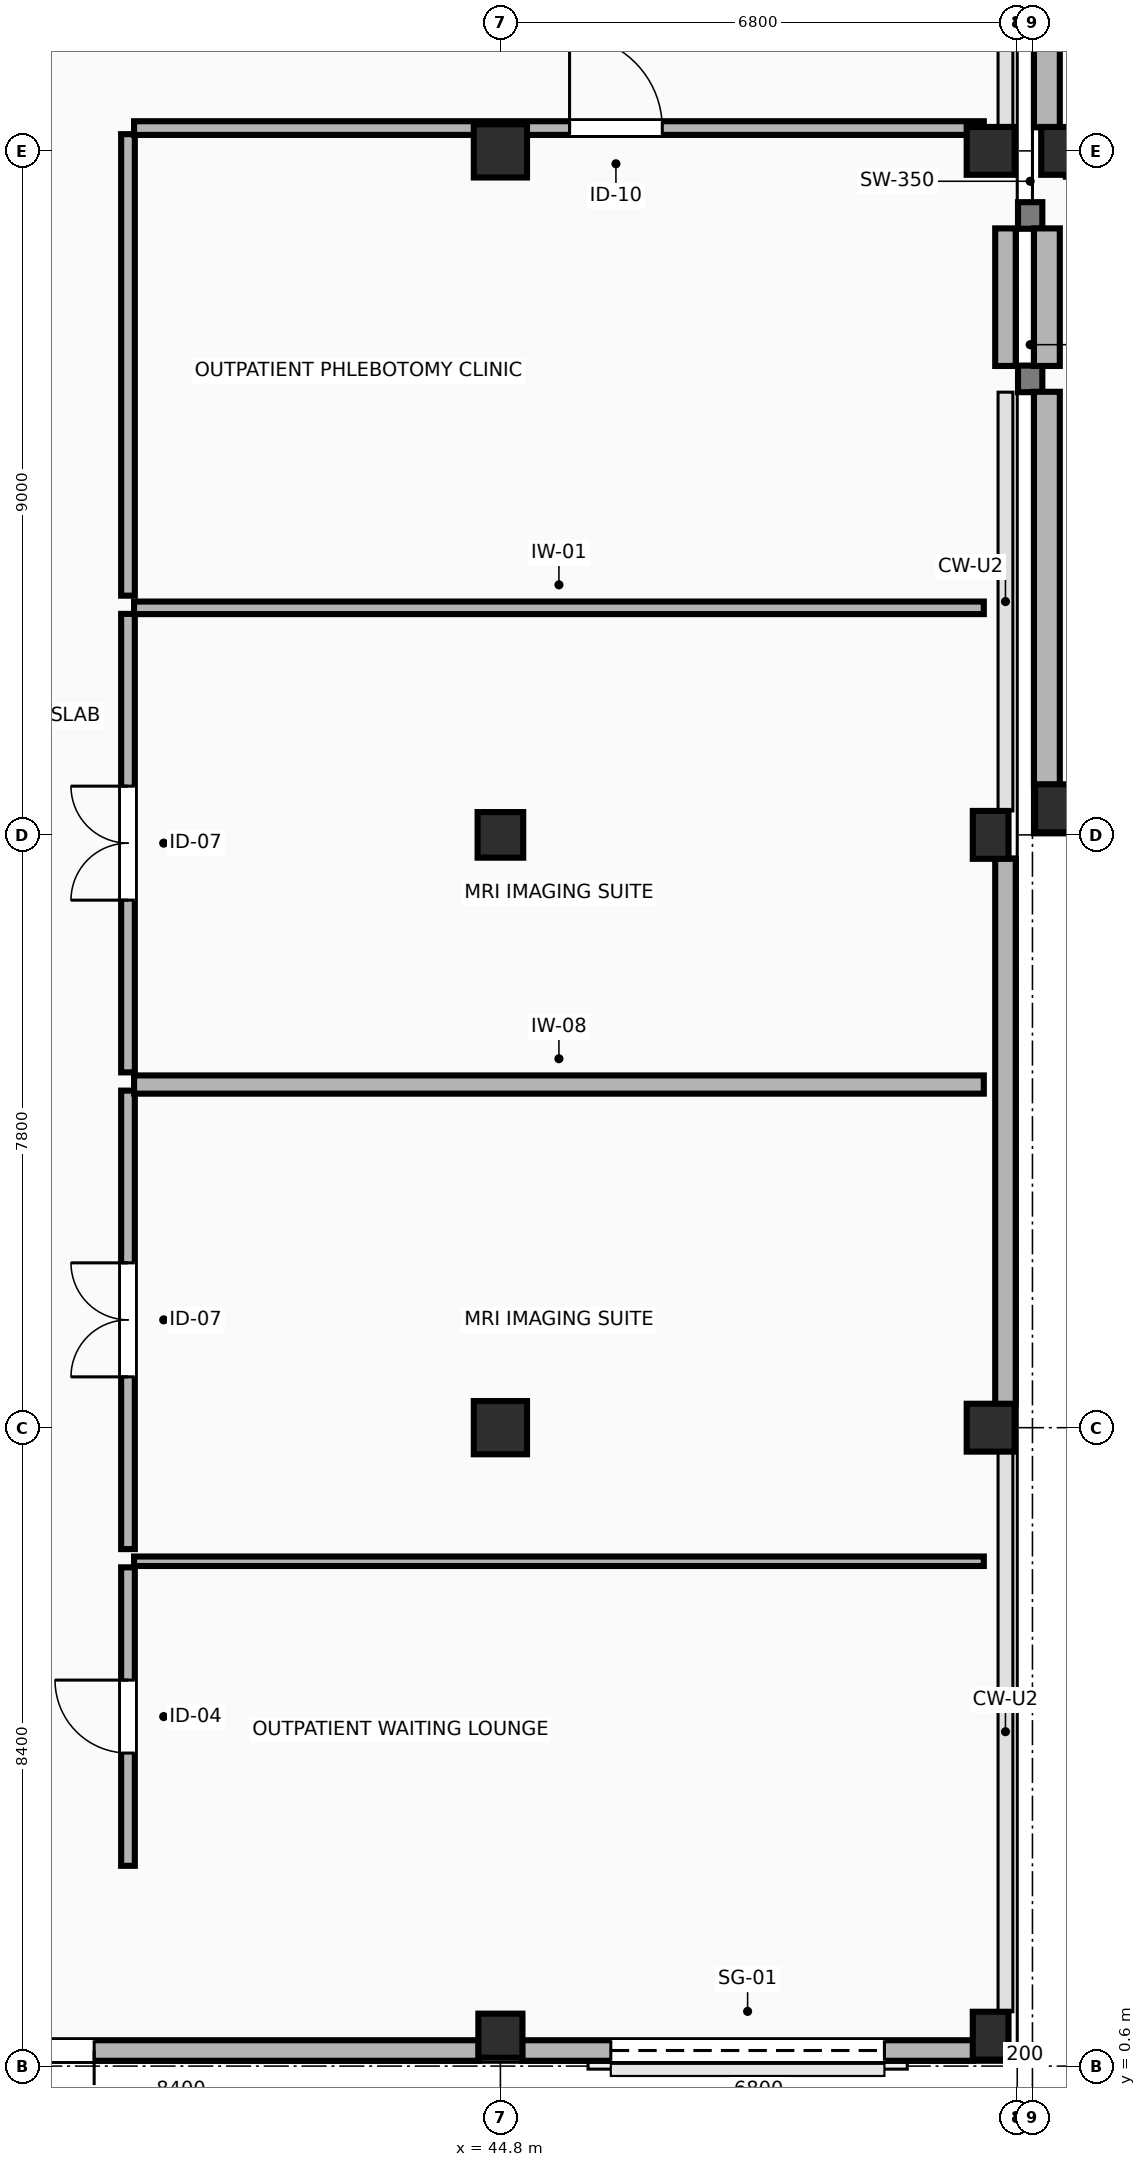
"""IFC4 building model, lengths in metres.
Left out: names, types, materials, properties, quantities, classifications, styles, units other than length and angle.
Written with IfcOpenShell. Run it as: python <this file> out.ifc"""

import sys

from ifc_helpers import new_model, si_unit, direction, frame, frame_2d, origin, origin_2d, place, context, subcontext, project, spatial, rectangle, extrude, element, fill, save


model = new_model("IFC4")
c1 = context("Model", 3, precision=1e-05, world=origin(), true_north=direction((0.0, 1.0)))
c2 = subcontext(c1, "Body", "Model", "MODEL_VIEW")
j1 = project(units=[si_unit("LENGTHUNIT", "METRE"), si_unit("PLANEANGLEUNIT", "RADIAN")], contexts=[c1])
p1 = place(None, origin())
s1 = spatial("IfcSite", under=j1, at=p1, CompositionType="ELEMENT")
p2 = place(p1, origin())
s2 = spatial("IfcBuilding", under=s1, at=p2, CompositionType="ELEMENT")
p3 = place(p2, origin())
s3 = spatial("IfcBuildingStorey", under=s2, at=p3, CompositionType="ELEMENT", Elevation=0.0)
p4 = place(p3, frame((44.8, 1.0, -1.75), z_axis=(0.0, 0.0, 1.0), x_axis=(1.0, 0.0, 0.0)))
e1 = element("IfcColumn", 1, at=p4, inside=s3, PredefinedType="COLUMN", context=c2, shape_type="SweptSolid", body=[
    extrude(rectangle(XDim=0.58, YDim=0.58, at=origin_2d()), origin(), (0.0, 0.0, 1.0), 7.15),
])
p5 = place(p3, frame((44.8, 9.0, 0.0), z_axis=(0.0, 0.0, 1.0), x_axis=(1.0, 0.0, 0.0)))
e2 = element("IfcColumn", 2, at=p5, inside=s3, PredefinedType="COLUMN", context=c2, shape_type="SweptSolid", body=[
    extrude(rectangle(XDim=0.7, YDim=0.7, at=origin_2d()), origin(), (0.0, 0.0, 1.0), 5.4),
])
p6 = place(p3, frame((44.8, 16.8, 0.0), z_axis=(0.0, 0.0, 1.0), x_axis=(1.0, 0.0, 0.0)))
e3 = element("IfcColumn", 3, at=p6, inside=s3, PredefinedType="COLUMN", context=c2, shape_type="SweptSolid", body=[
    extrude(rectangle(XDim=0.6, YDim=0.6, at=origin_2d()), origin(), (0.0, 0.0, 1.0), 5.4),
])
p7 = place(p3, frame((44.8, 25.8, 0.0), z_axis=(0.0, 0.0, 1.0), x_axis=(1.0, 0.0, 0.0)))
e4 = element("IfcColumn", 4, at=p7, inside=s3, PredefinedType="COLUMN", context=c2, shape_type="SweptSolid", body=[
    extrude(rectangle(XDim=0.7, YDim=0.7, at=origin_2d()), origin(), (0.0, 0.0, 1.0), 5.4),
])
p8 = place(p3, frame((51.25, 1.0, -1.75), z_axis=(0.0, 0.0, 1.0), x_axis=(1.0, 0.0, 0.0)))
e5 = element("IfcColumn", 5, at=p8, inside=s3, PredefinedType="COLUMN", context=c2, shape_type="SweptSolid", body=[
    extrude(rectangle(XDim=0.47, YDim=0.63, at=origin_2d()), origin(), (0.0, 0.0, 1.0), 7.15),
])
p9 = place(p3, frame((51.25, 9.0, 0.0), z_axis=(0.0, 0.0, 1.0), x_axis=(1.0, 0.0, 0.0)))
e6 = element("IfcColumn", 6, at=p9, inside=s3, PredefinedType="COLUMN", context=c2, shape_type="SweptSolid", body=[
    extrude(rectangle(XDim=0.63, YDim=0.63, at=origin_2d()), origin(), (0.0, 0.0, 1.0), 5.4),
])
p10 = place(p3, frame((51.25, 16.8, 0.0), z_axis=(0.0, 0.0, 1.0), x_axis=(1.0, 0.0, 0.0)))
e7 = element("IfcColumn", 7, at=p10, inside=s3, PredefinedType="COLUMN", context=c2, shape_type="SweptSolid", body=[
    extrude(rectangle(XDim=0.47, YDim=0.63, at=origin_2d()), origin(), (0.0, 0.0, 1.0), 5.4),
])
p11 = place(p3, frame((51.25, 25.8, 0.0), z_axis=(0.0, 0.0, 1.0), x_axis=(1.0, 0.0, 0.0)))
e8 = element("IfcColumn", 8, at=p11, inside=s3, PredefinedType="COLUMN", context=c2, shape_type="SweptSolid", body=[
    extrude(rectangle(XDim=0.63, YDim=0.63, at=origin_2d()), origin(), (0.0, 0.0, 1.0), 5.4),
])
p12 = place(p3, frame((52.15, 17.15, -1.75), z_axis=(0.0, 0.0, 1.0), x_axis=(1.0, 0.0, 0.0)))
e9 = element("IfcColumn", 9, at=p12, inside=s3, PredefinedType="COLUMN", context=c2, shape_type="SweptSolid", body=[
    extrude(rectangle(XDim=0.63, YDim=0.63, at=origin_2d()), origin(), (0.0, 0.0, 1.0), 7.15),
])
p13 = place(p3, frame((52.15, 25.8, -1.75), z_axis=(0.0, 0.0, 1.0), x_axis=(1.0, 0.0, 0.0)))
e10 = element("IfcColumn", 10, at=p13, inside=s3, PredefinedType="COLUMN", context=c2, shape_type="SweptSolid", body=[
    extrude(rectangle(XDim=0.47, YDim=0.63, at=origin_2d()), origin(), (0.0, 0.0, 1.0), 7.15),
])
for number, where, z_axis, x_axis in (
    (11, (51.61, 22.8, -1.75), (0.0, 0.0, 1.0), (1.0, 0.0, 0.0)),
    (12, (51.61, 24.95, -1.75), (0.0, 0.0, 1.0), (1.0, 0.0, 0.0)),
):
    element("IfcWall", number, at=place(p3, frame(where, z_axis=z_axis, x_axis=x_axis)), inside=s3, PredefinedType="SHEAR", context=c2, shape_type="SweptSolid", body=[
        extrude(rectangle(XDim=0.32, YDim=0.35, at=frame_2d((0.16, 0.0))), origin(), (0.0, 0.0, 1.0), 7.15),
    ])
p14 = place(p3, frame((36.71, 0.805, 0.0), z_axis=(0.0, 0.0, 1.0), x_axis=(1.0, 0.0, 0.0)))
e13 = element("IfcWall", 13, at=p14, inside=s3, PredefinedType="STANDARD", context=c2, shape_type="SweptSolid", body=[
    extrude(rectangle(XDim=7.805, YDim=0.27, at=frame_2d((3.902, 0.0))), origin(), (0.0, 0.0, 1.0), 4.42),
])
p15 = place(p14, frame((0.745, 0.0, 0.0)))
e14 = element("IfcOpeningElement", 14, at=p15, cuts=e13, PredefinedType="OPENING", context=c2, shape_type="SweptSolid", body=[
    extrude(rectangle(XDim=2.0, YDim=2.4, at=frame_2d((1.0, 1.2))), frame((0.0, 0.145, 0.0), z_axis=(0.0, -1.0, 0.0), x_axis=(1.0, 0.0, 0.0)), (0.0, 0.0, 1.0), 0.29),
])
p16 = place(p3, frame((45.085, 0.805, 0.0), z_axis=(0.0, 0.0, 1.0), x_axis=(1.0, 0.0, 0.0)))
e15 = element("IfcWall", 15, at=p16, inside=s3, PredefinedType="STANDARD", context=c2, shape_type="SweptSolid", body=[
    extrude(rectangle(XDim=5.935, YDim=0.27, at=frame_2d((2.968, 0.0))), origin(), (0.0, 0.0, 1.0), 4.62),
])
p17 = place(p16, frame((1.167, 0.0, 0.0)))
e16 = element("IfcOpeningElement", 16, at=p17, cuts=e15, PredefinedType="OPENING", context=c2, shape_type="SweptSolid", body=[
    extrude(rectangle(XDim=3.6, YDim=3.0, at=frame_2d((1.8, 1.5))), frame((0.0, 0.145, 0.0), z_axis=(0.0, -1.0, 0.0), x_axis=(1.0, 0.0, 0.0)), (0.0, 0.0, 1.0), 0.29),
])
p18 = place(p3, frame((51.445, 9.31, 0.0), z_axis=(0.0, 0.0, 1.0), x_axis=(0.0, 1.0, 0.0)))
e17 = element("IfcWall", 17, at=p18, inside=s3, PredefinedType="STANDARD", context=c2, shape_type="SweptSolid", body=[
    extrude(rectangle(XDim=7.18, YDim=0.27, at=frame_2d((3.59, 0.0))), origin(), (0.0, 0.0, 1.0), 4.57),
])
p19 = place(p3, frame((51.445, 22.97, 0.0), z_axis=(0.0, 0.0, 1.0), x_axis=(0.0, 1.0, 0.0)))
e18 = element("IfcWall", 18, at=p19, inside=s3, PredefinedType="STANDARD", context=c2, shape_type="SweptSolid", body=[
    extrude(rectangle(XDim=1.81, YDim=0.27, at=frame_2d((0.905, 0.0))), origin(), (0.0, 0.0, 1.0), 3.508),
])
p20 = place(p3, frame((51.99, 33.94, 0.0), z_axis=(0.0, 0.0, 1.0), x_axis=(0.0, -1.0, 0.0)))
e19 = element("IfcWall", 19, at=p20, inside=s3, PredefinedType="STANDARD", context=c2, shape_type="SweptSolid", body=[
    extrude(rectangle(XDim=7.83, YDim=0.34, at=frame_2d((3.915, 0.0))), origin(), (0.0, 0.0, 1.0), 4.565),
])
p21 = place(p3, frame((51.99, 24.78, 0.0), z_axis=(0.0, 0.0, 1.0), x_axis=(0.0, -1.0, 0.0)))
e20 = element("IfcWall", 20, at=p21, inside=s3, PredefinedType="STANDARD", context=c2, shape_type="SweptSolid", body=[
    extrude(rectangle(XDim=1.81, YDim=0.34, at=frame_2d((0.905, 0.0))), origin(), (0.0, 0.0, 1.0), 3.508),
])
p22 = place(p3, frame((51.99, 22.63, 0.0), z_axis=(0.0, 0.0, 1.0), x_axis=(0.0, -1.0, 0.0)))
e21 = element("IfcWall", 21, at=p22, inside=s3, PredefinedType="STANDARD", context=c2, shape_type="SweptSolid", body=[
    extrude(rectangle(XDim=5.17, YDim=0.34, at=frame_2d((2.585, 0.0))), origin(), (0.0, 0.0, 1.0), 3.508),
])
p23 = place(p3, frame((39.98, 7.242, 0.0), z_axis=(0.0, 0.0, 1.0), x_axis=(1.0, 0.0, 0.0)))
e22 = element("IfcWall", 22, at=p23, inside=s3, PredefinedType="PARTITIONING", context=c2, shape_type="SweptSolid", body=[
    extrude(rectangle(XDim=11.18, YDim=0.125, at=frame_2d((5.59, 0.0))), origin(), (0.0, 0.0, 1.0), 5.05),
])
p24 = place(p3, frame((39.9, 3.235, 0.0), z_axis=(0.0, 0.0, 1.0), x_axis=(0.0, 1.0, 0.0)))
e23 = element("IfcWall", 23, at=p24, inside=s3, PredefinedType="PARTITIONING", context=c2, shape_type="SweptSolid", body=[
    extrude(rectangle(XDim=3.927, YDim=0.18, at=frame_2d((1.964, 0.0))), origin(), (0.0, 0.0, 1.0), 5.05),
])
p25 = place(p24, frame((1.484, 0.0, 0.0)))
e24 = element("IfcOpeningElement", 24, at=p25, cuts=e23, PredefinedType="OPENING", context=c2, shape_type="SweptSolid", body=[
    extrude(rectangle(XDim=0.96, YDim=2.1, at=frame_2d((0.48, 1.05))), frame((0.0, 0.1, 0.0), z_axis=(0.0, -1.0, 0.0), x_axis=(1.0, 0.0, 0.0)), (0.0, 0.0, 1.0), 0.2),
])
p26 = place(p3, frame((39.9, 7.403, 0.0), z_axis=(0.0, 0.0, 1.0), x_axis=(0.0, 1.0, 0.0)))
e25 = element("IfcWall", 25, at=p26, inside=s3, PredefinedType="PARTITIONING", context=c2, shape_type="SweptSolid", body=[
    extrude(rectangle(XDim=6.032, YDim=0.18, at=frame_2d((3.016, 0.0))), origin(), (0.0, 0.0, 1.0), 5.05),
])
p27 = place(p26, frame((2.266, 0.0, 0.0)))
e26 = element("IfcOpeningElement", 26, at=p27, cuts=e25, PredefinedType="OPENING", context=c2, shape_type="SweptSolid", body=[
    extrude(rectangle(XDim=1.5, YDim=2.3, at=frame_2d((0.75, 1.15))), frame((0.0, 0.1, 0.0), z_axis=(0.0, -1.0, 0.0), x_axis=(1.0, 0.0, 0.0)), (0.0, 0.0, 1.0), 0.2),
])
p28 = place(p3, frame((39.98, 13.515, 0.0), z_axis=(0.0, 0.0, 1.0), x_axis=(1.0, 0.0, 0.0)))
e27 = element("IfcWall", 27, at=p28, inside=s3, PredefinedType="PARTITIONING", context=c2, shape_type="SweptSolid", body=[
    extrude(rectangle(XDim=11.18, YDim=0.24, at=frame_2d((5.59, 0.0))), origin(), (0.0, 0.0, 1.0), 5.05),
])
p29 = place(p3, frame((39.9, 13.675, 0.0), z_axis=(0.0, 0.0, 1.0), x_axis=(0.0, 1.0, 0.0)))
e28 = element("IfcWall", 28, at=p29, inside=s3, PredefinedType="PARTITIONING", context=c2, shape_type="SweptSolid", body=[
    extrude(rectangle(XDim=6.032, YDim=0.18, at=frame_2d((3.016, 0.0))), origin(), (0.0, 0.0, 1.0), 5.05),
])
p30 = place(p29, frame((2.266, 0.0, 0.0)))
e29 = element("IfcOpeningElement", 29, at=p30, cuts=e28, PredefinedType="OPENING", context=c2, shape_type="SweptSolid", body=[
    extrude(rectangle(XDim=1.5, YDim=2.3, at=frame_2d((0.75, 1.15))), frame((0.0, 0.1, 0.0), z_axis=(0.0, -1.0, 0.0), x_axis=(1.0, 0.0, 0.0)), (0.0, 0.0, 1.0), 0.2),
])
p31 = place(p3, frame((39.98, 19.788, 0.0), z_axis=(0.0, 0.0, 1.0), x_axis=(1.0, 0.0, 0.0)))
e30 = element("IfcWall", 30, at=p31, inside=s3, PredefinedType="PARTITIONING", context=c2, shape_type="SweptSolid", body=[
    extrude(rectangle(XDim=11.18, YDim=0.165, at=frame_2d((5.59, 0.0))), origin(), (0.0, 0.0, 1.0), 5.05),
])
p32 = place(p3, frame((39.9, 19.948, 0.0), z_axis=(0.0, 0.0, 1.0), x_axis=(0.0, 1.0, 0.0)))
e31 = element("IfcWall", 31, at=p32, inside=s3, PredefinedType="PARTITIONING", context=c2, shape_type="SweptSolid", body=[
    extrude(rectangle(XDim=6.073, YDim=0.18, at=frame_2d((3.036, 0.0))), origin(), (0.0, 0.0, 1.0), 5.05),
])
p33 = place(p3, frame((39.98, 26.1, 0.0), z_axis=(0.0, 0.0, 1.0), x_axis=(1.0, 0.0, 0.0)))
e32 = element("IfcWall", 32, at=p33, inside=s3, PredefinedType="PARTITIONING", context=c2, shape_type="SweptSolid", body=[
    extrude(rectangle(XDim=11.18, YDim=0.18, at=frame_2d((5.59, 0.0))), origin(), (0.0, 0.0, 1.0), 4.385),
])
p34 = place(p33, frame((5.73, 0.0, 0.0)))
e33 = element("IfcOpeningElement", 33, at=p34, cuts=e32, PredefinedType="OPENING", context=c2, shape_type="SweptSolid", body=[
    extrude(rectangle(XDim=1.22, YDim=2.18, at=frame_2d((0.61, 1.09))), frame((0.0, 0.1, 0.0), z_axis=(0.0, -1.0, 0.0), x_axis=(1.0, 0.0, 0.0)), (0.0, 0.0, 1.0), 0.2),
])
p35 = place(p15, frame((2.0, 0.0, 0.0), z_axis=(0.0, 0.0, 1.0), x_axis=(-1.0, 0.0, 0.0)))
e34 = element("IfcDoor", 34, at=p35, inside=s3, OperationType="DOUBLE_DOOR_SINGLE_SWING", PredefinedType="DOOR", context=c2, shape_type="SweptSolid", body=[
    extrude(rectangle(XDim=2.0, YDim=2.4, at=frame_2d((1.0, 1.2))), frame((0.0, 0.025, 0.0), z_axis=(0.0, -1.0, 0.0), x_axis=(1.0, 0.0, 0.0)), (0.0, 0.0, 1.0), 0.05),
])
fill(e14, e34)
p36 = place(p17, frame((3.6, 0.0, 0.0), z_axis=(0.0, 0.0, 1.0), x_axis=(-1.0, 0.0, 0.0)))
e35 = element("IfcDoor", 35, at=p36, inside=s3, OperationType="DOUBLE_DOOR_SINGLE_SWING", PredefinedType="GATE", context=c2, shape_type="SweptSolid", body=[
    extrude(rectangle(XDim=3.6, YDim=3.0, at=frame_2d((1.8, 1.5))), frame((0.0, 0.025, 0.0), z_axis=(0.0, -1.0, 0.0), x_axis=(1.0, 0.0, 0.0)), (0.0, 0.0, 1.0), 0.05),
])
fill(e16, e35)
p37 = place(p25, origin())
e36 = element("IfcDoor", 36, at=p37, inside=s3, OperationType="SINGLE_SWING_RIGHT", PredefinedType="DOOR", context=c2, shape_type="SweptSolid", body=[
    extrude(rectangle(XDim=0.96, YDim=2.1, at=frame_2d((0.48, 1.05))), frame((0.0, 0.025, 0.0), z_axis=(0.0, -1.0, 0.0), x_axis=(1.0, 0.0, 0.0)), (0.0, 0.0, 1.0), 0.05),
])
fill(e24, e36)
p38 = place(p27, origin())
e37 = element("IfcDoor", 37, at=p38, inside=s3, OperationType="DOUBLE_DOOR_SINGLE_SWING", PredefinedType="DOOR", context=c2, shape_type="SweptSolid", body=[
    extrude(rectangle(XDim=1.5, YDim=2.3, at=frame_2d((0.75, 1.15))), frame((0.0, 0.025, 0.0), z_axis=(0.0, -1.0, 0.0), x_axis=(1.0, 0.0, 0.0)), (0.0, 0.0, 1.0), 0.05),
])
fill(e26, e37)
p39 = place(p30, origin())
e38 = element("IfcDoor", 38, at=p39, inside=s3, OperationType="DOUBLE_DOOR_SINGLE_SWING", PredefinedType="DOOR", context=c2, shape_type="SweptSolid", body=[
    extrude(rectangle(XDim=1.5, YDim=2.3, at=frame_2d((0.75, 1.15))), frame((0.0, 0.025, 0.0), z_axis=(0.0, -1.0, 0.0), x_axis=(1.0, 0.0, 0.0)), (0.0, 0.0, 1.0), 0.05),
])
fill(e29, e38)
p40 = place(p34, origin())
e39 = element("IfcDoor", 39, at=p40, inside=s3, OperationType="SINGLE_SWING_LEFT", PredefinedType="DOOR", context=c2, shape_type="SweptSolid", body=[
    extrude(rectangle(XDim=1.22, YDim=2.18, at=frame_2d((0.61, 1.09))), frame((0.0, 0.025, 0.0), z_axis=(0.0, -1.0, 0.0), x_axis=(1.0, 0.0, 0.0)), (0.0, 0.0, 1.0), 0.05),
])
fill(e33, e39)
save(model, sys.argv[1])
